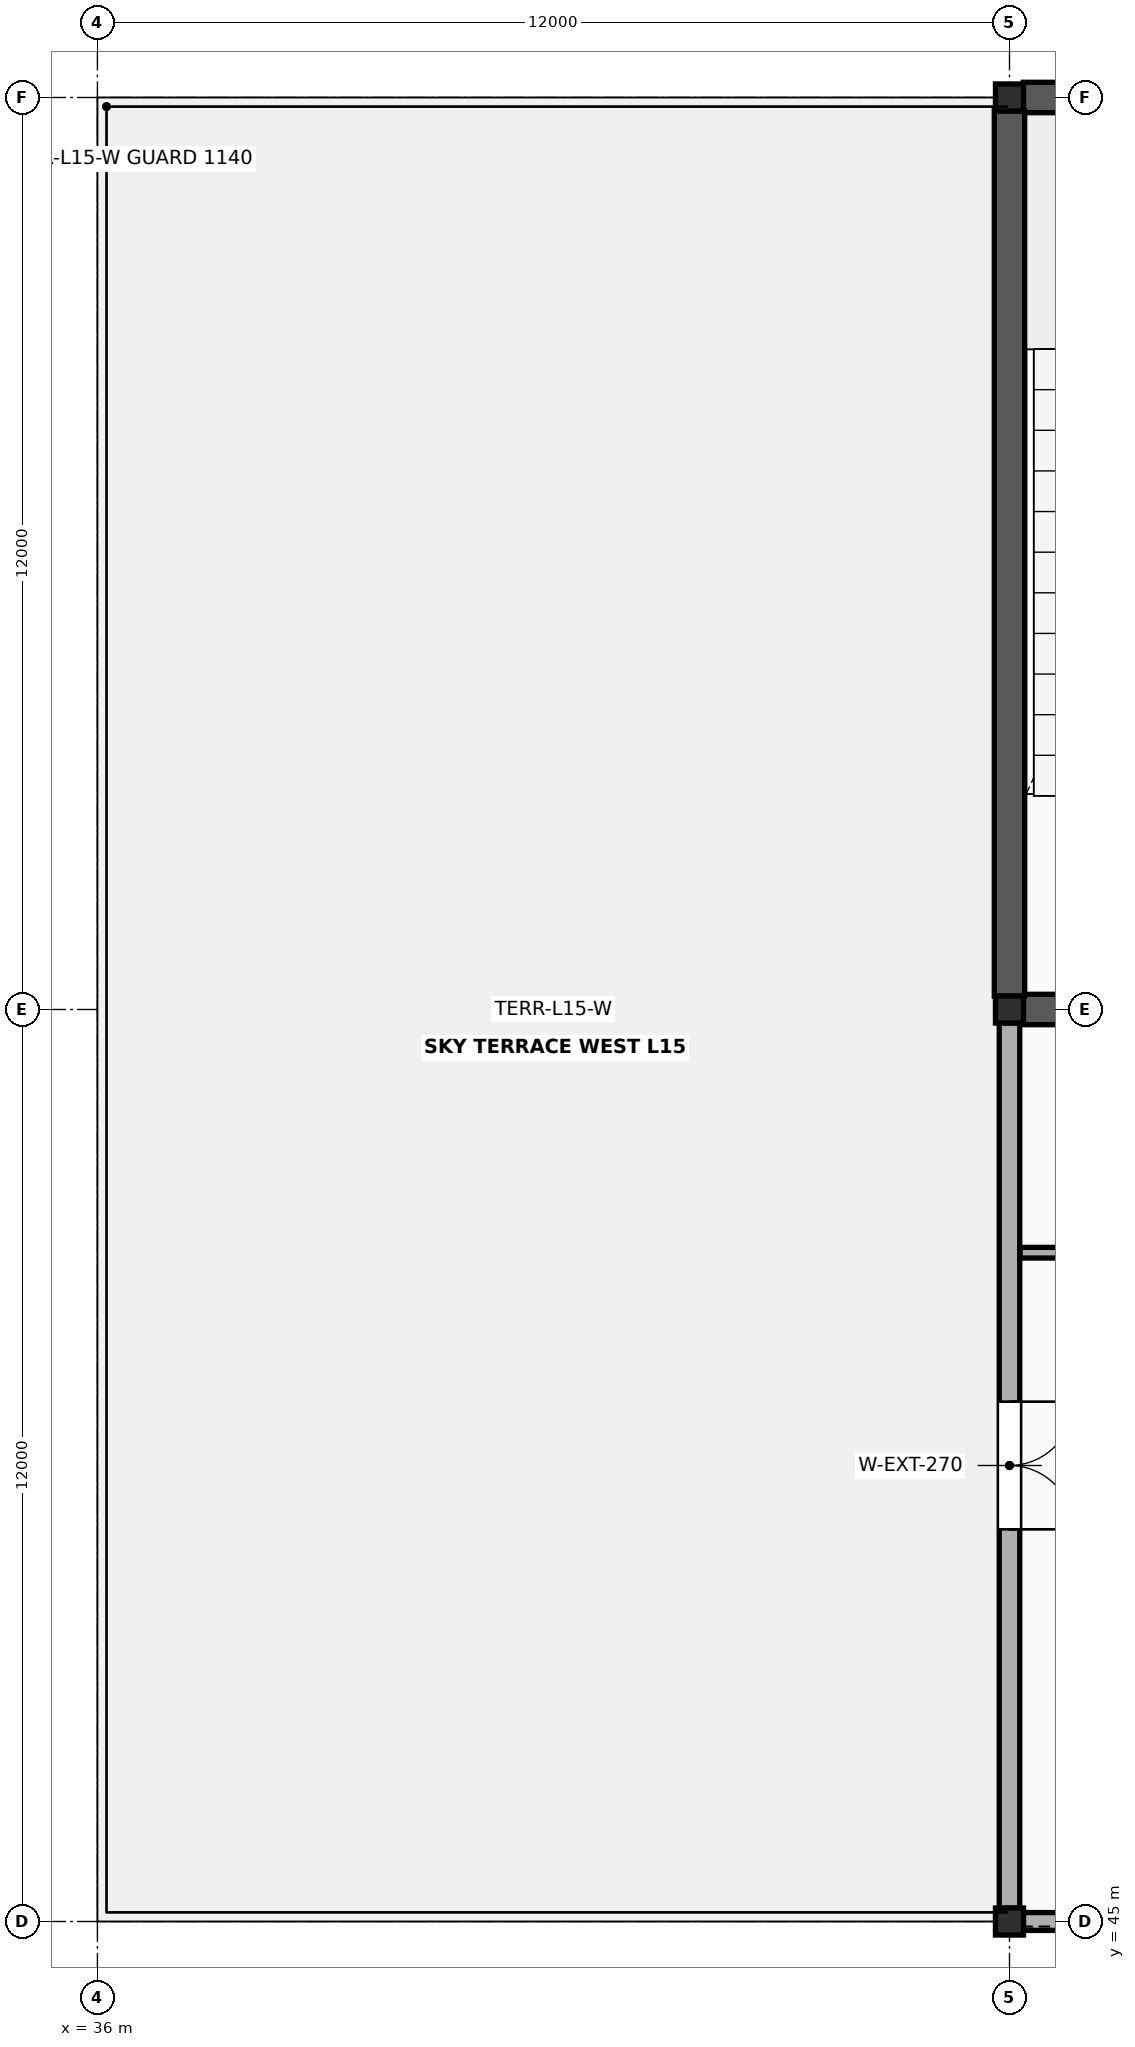
"""IFC4 building model, lengths in metres.
Left out: names, types, materials, properties, quantities, classifications, styles, units other than length and angle.
Written with IfcOpenShell. Run it as: python <this file> out.ifc"""

import sys

from ifc_helpers import new_model, si_unit, direction, frame, frame_2d, origin, origin_2d, place, context, subcontext, project, spatial, rectangle, i_section, extrude, element, fill, save


model = new_model("IFC4")
c1 = context("Model", 3, precision=1e-05, world=origin(), true_north=direction((0.0, 1.0)))
c2 = subcontext(c1, "Body", "Model", "MODEL_VIEW")
j1 = project(units=[si_unit("LENGTHUNIT", "METRE"), si_unit("PLANEANGLEUNIT", "RADIAN")], contexts=[c1])
p1 = place(None, origin())
s1 = spatial("IfcSite", under=j1, at=p1, CompositionType="ELEMENT")
p2 = place(p1, origin())
s2 = spatial("IfcBuilding", under=s1, at=p2, CompositionType="ELEMENT")
p3 = place(p2, frame((0.0, 0.0, 61.6)))
s3 = spatial("IfcBuildingStorey", under=s2, at=p3, CompositionType="ELEMENT", Elevation=61.6)
for number, where, z_axis, x_axis in (
    (1, (48.0, 45.0, 0.0), (0.0, 0.0, 1.0), (1.0, 0.0, 0.0)),
    (2, (48.0, 57.0, 0.0), (0.0, 0.0, 1.0), (1.0, 0.0, 0.0)),
    (3, (48.0, 69.0, 0.0), (0.0, 0.0, 1.0), (1.0, 0.0, 0.0)),
):
    element("IfcColumn", number, at=place(p3, frame(where, z_axis=z_axis, x_axis=x_axis)), inside=s3, PredefinedType="COLUMN", context=c2, shape_type="SweptSolid", body=[
        extrude(i_section(OverallWidth=0.369, OverallDepth=0.356, WebThickness=0.011, FlangeThickness=0.018, FilletRadius=0.018, at=origin_2d()), origin(), (0.0, 0.0, 1.0), 4.0),
    ])
p4 = place(p3, frame((48.181, 57.0, 0.0), z_axis=(0.0, 0.0, 1.0), x_axis=(1.0, 0.0, 0.0)))
e4 = element("IfcWall", 4, at=p4, inside=s3, PredefinedType="SHEAR", context=c2, shape_type="SweptSolid", body=[
    extrude(rectangle(XDim=11.637, YDim=0.4, at=frame_2d((5.819, 0.0))), origin(), (0.0, 0.0, 1.0), 3.843),
])
p5 = place(p4, frame((5.019, 0.0, 0.0)))
e5 = element("IfcOpeningElement", 5, at=p5, cuts=e4, PredefinedType="OPENING", context=c2, shape_type="SweptSolid", body=[
    extrude(rectangle(XDim=1.2, YDim=2.2, at=frame_2d((0.6, 1.1))), frame((0.0, 0.215, 0.0), z_axis=(0.0, -1.0, 0.0), x_axis=(1.0, 0.0, 0.0)), (0.0, 0.0, 1.0), 0.43),
])
p6 = place(p4, frame((8.718, 0.0, 0.0)))
e6 = element("IfcOpeningElement", 6, at=p6, cuts=e4, PredefinedType="OPENING", context=c2, shape_type="SweptSolid", body=[
    extrude(rectangle(XDim=1.5, YDim=2.25, at=frame_2d((0.75, 1.125))), frame((0.0, 0.215, 0.0), z_axis=(0.0, -1.0, 0.0), x_axis=(1.0, 0.0, 0.0)), (0.0, 0.0, 1.0), 0.43),
])
p7 = place(p3, frame((48.181, 69.0, 0.0), z_axis=(0.0, 0.0, 1.0), x_axis=(1.0, 0.0, 0.0)))
e7 = element("IfcWall", 7, at=p7, inside=s3, PredefinedType="SHEAR", context=c2, shape_type="SweptSolid", body=[
    extrude(rectangle(XDim=11.637, YDim=0.4, at=frame_2d((5.819, 0.0))), origin(), (0.0, 0.0, 1.0), 3.843),
])
p8 = place(p3, frame((48.0, 57.175, 0.0), z_axis=(0.0, 0.0, 1.0), x_axis=(0.0, 1.0, 0.0)))
e8 = element("IfcWall", 8, at=p8, inside=s3, PredefinedType="SHEAR", context=c2, shape_type="SweptSolid", body=[
    extrude(rectangle(XDim=11.65, YDim=0.4, at=frame_2d((5.825, 0.0))), origin(), (0.0, 0.0, 1.0), 3.843),
])
p9 = place(p3, frame((48.183, 45.0, 0.0), z_axis=(0.0, 0.0, 1.0), x_axis=(1.0, 0.0, 0.0)))
e9 = element("IfcWall", 9, at=p9, inside=s3, PredefinedType="SOLIDWALL", context=c2, shape_type="SweptSolid", body=[
    extrude(rectangle(XDim=11.635, YDim=0.235, at=frame_2d((5.817, 0.0))), origin(), (0.0, 0.0, 1.0), 3.296),
])
p10 = place(p9, frame((1.74, 0.0, 0.78)))
e10 = element("IfcOpeningElement", 10, at=p10, cuts=e9, PredefinedType="OPENING", context=c2, shape_type="SweptSolid", body=[
    extrude(rectangle(XDim=2.22, YDim=1.74, at=frame_2d((1.11, 0.87))), frame((0.0, 0.133, 0.0), z_axis=(0.0, -1.0, 0.0), x_axis=(1.0, 0.0, 0.0)), (0.0, 0.0, 1.0), 0.265),
])
p11 = place(p9, frame((7.585, 0.0, 0.78)))
e11 = element("IfcOpeningElement", 11, at=p11, cuts=e9, PredefinedType="OPENING", context=c2, shape_type="SweptSolid", body=[
    extrude(rectangle(XDim=2.4, YDim=1.74, at=frame_2d((1.2, 0.87))), frame((0.0, 0.133, 0.0), z_axis=(0.0, -1.0, 0.0), x_axis=(1.0, 0.0, 0.0)), (0.0, 0.0, 1.0), 0.265),
])
p12 = place(p3, frame((48.0, 45.176, 0.0), z_axis=(0.0, 0.0, 1.0), x_axis=(0.0, 1.0, 0.0)))
e12 = element("IfcWall", 12, at=p12, inside=s3, PredefinedType="SOLIDWALL", context=c2, shape_type="SweptSolid", body=[
    extrude(rectangle(XDim=11.648, YDim=0.27, at=frame_2d((5.824, 0.0))), origin(), (0.0, 0.0, 1.0), 3.296),
])
p13 = place(p12, frame((4.984, 0.0, 0.0)))
e13 = element("IfcOpeningElement", 13, at=p13, cuts=e12, PredefinedType="OPENING", context=c2, shape_type="SweptSolid", body=[
    extrude(rectangle(XDim=1.68, YDim=2.34, at=frame_2d((0.84, 1.17))), frame((0.0, 0.15, 0.0), z_axis=(0.0, -1.0, 0.0), x_axis=(1.0, 0.0, 0.0)), (0.0, 0.0, 1.0), 0.3),
])
p14 = place(p3, frame((48.14, 53.8, 0.0), z_axis=(0.0, 0.0, 1.0), x_axis=(1.0, 0.0, 0.0)))
e14 = element("IfcWall", 14, at=p14, inside=s3, PredefinedType="PARTITIONING", context=c2, shape_type="SweptSolid", body=[
    extrude(rectangle(XDim=19.26, YDim=0.14, at=frame_2d((9.63, 0.0))), origin(), (0.0, 0.0, 1.0), 2.88),
])
p15 = place(p14, frame((9.17, 0.0, 0.0)))
e15 = element("IfcOpeningElement", 15, at=p15, cuts=e14, PredefinedType="OPENING", context=c2, shape_type="SweptSolid", body=[
    extrude(rectangle(XDim=0.92, YDim=2.1, at=frame_2d((0.46, 1.05))), frame((0.0, 0.085, 0.0), z_axis=(0.0, -1.0, 0.0), x_axis=(1.0, 0.0, 0.0)), (0.0, 0.0, 1.0), 0.17),
])
p16 = place(p13, origin())
e16 = element("IfcDoor", 16, at=p16, inside=s3, OperationType="DOUBLE_DOOR_SINGLE_SWING", PredefinedType="DOOR", context=c2, shape_type="SweptSolid", body=[
    extrude(rectangle(XDim=1.68, YDim=2.34, at=frame_2d((0.84, 1.17))), frame((0.0, 0.025, 0.0), z_axis=(0.0, -1.0, 0.0), x_axis=(1.0, 0.0, 0.0)), (0.0, 0.0, 1.0), 0.05),
])
fill(e13, e16)
save(model, sys.argv[1])
